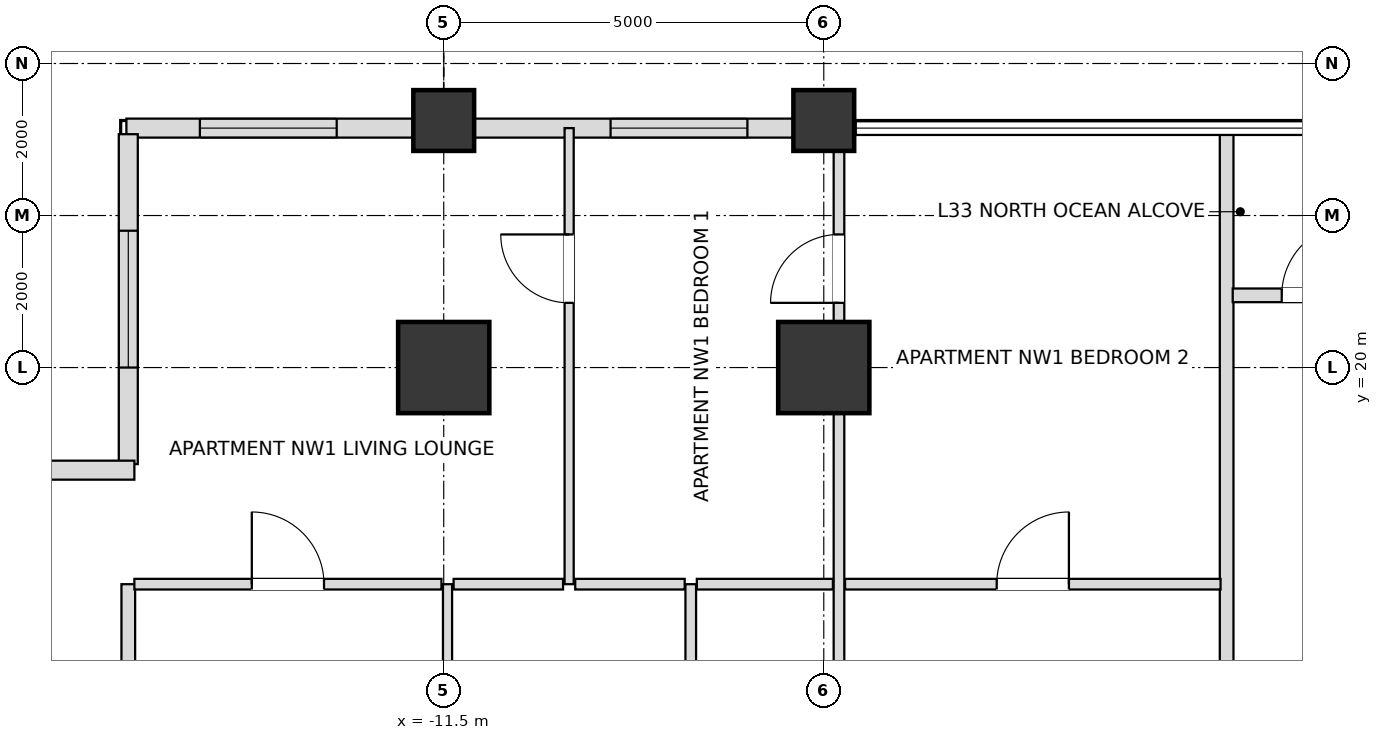
"""IFC4 building model, lengths in metres.
Left out: names, types, materials, properties, quantities, classifications, styles, units other than length and angle.
Written with IfcOpenShell. Run it as: python <this file> out.ifc"""

import sys

from ifc_helpers import new_model, si_unit, direction, frame, frame_2d, origin, origin_2d, place, context, subcontext, project, spatial, rectangle, extrude, element, fill, save


model = new_model("IFC4")
c1 = context("Model", 3, precision=1e-05, world=origin(), true_north=direction((0.0, 1.0)))
c2 = subcontext(c1, "Body", "Model", "MODEL_VIEW")
j1 = project(units=[si_unit("LENGTHUNIT", "METRE"), si_unit("PLANEANGLEUNIT", "RADIAN")], contexts=[c1])
p1 = place(None, origin())
s1 = spatial("IfcSite", under=j1, at=p1, CompositionType="ELEMENT")
p2 = place(p1, origin())
s2 = spatial("IfcBuilding", under=s1, at=p2, CompositionType="ELEMENT")
p3 = place(p2, frame((0.0, 0.0, 133.2)))
s3 = spatial("IfcBuildingStorey", under=s2, at=p3, CompositionType="ELEMENT", Elevation=133.2)
for number, where, z_axis, x_axis in (
    (1, (-6.5, 20.0, 0.0), (0.0, 0.0, 1.0), (1.0, 0.0, 0.0)),
    (2, (-11.5, 20.0, 0.0), (0.0, 0.0, 1.0), (1.0, 0.0, 0.0)),
):
    element("IfcColumn", number, at=place(p3, frame(where, z_axis=z_axis, x_axis=x_axis)), inside=s3, PredefinedType="USERDEFINED", context=c2, shape_type="SweptSolid", body=[
        extrude(rectangle(XDim=1.2, YDim=1.2, at=origin_2d()), origin(), (0.0, 0.0, 1.0), 3.6),
    ])
for number, where, z_axis, x_axis in (
    (3, (-11.5, 23.25, 0.0), (0.0, 0.0, 1.0), (1.0, 0.0, 0.0)),
    (4, (-6.5, 23.25, 0.0), (0.0, 0.0, 1.0), (1.0, 0.0, 0.0)),
):
    element("IfcColumn", number, at=place(p3, frame(where, z_axis=z_axis, x_axis=x_axis)), inside=s3, PredefinedType="COLUMN", context=c2, shape_type="SweptSolid", body=[
        extrude(rectangle(XDim=0.8, YDim=0.8, at=origin_2d()), origin(), (0.0, 0.0, 1.0), 3.6),
    ])
p4 = place(p3, frame((-6.895, 23.15, 0.0), z_axis=(0.0, 0.0, 1.0), x_axis=(-1.0, 0.0, 0.0)))
e5 = element("IfcWall", 5, at=p4, inside=s3, PredefinedType="SOLIDWALL", context=c2, shape_type="SweptSolid", body=[
    extrude(rectangle(XDim=4.21, YDim=0.25, at=frame_2d((2.105, 0.0))), origin(), (0.0, 0.0, 1.0), 2.736),
])
p5 = place(p4, frame((0.61, 0.0, 0.72)))
e6 = element("IfcOpeningElement", 6, at=p5, cuts=e5, PredefinedType="OPENING", context=c2, shape_type="SweptSolid", body=[
    extrude(rectangle(XDim=1.8, YDim=1.68, at=frame_2d((0.9, 0.84))), frame((0.0, 0.135, 0.0), z_axis=(0.0, -1.0, 0.0), x_axis=(1.0, 0.0, 0.0)), (0.0, 0.0, 1.0), 0.27),
])
p6 = place(p3, frame((-11.895, 23.15, 0.0), z_axis=(0.0, 0.0, 1.0), x_axis=(-1.0, 0.0, 0.0)))
e7 = element("IfcWall", 7, at=p6, inside=s3, PredefinedType="SOLIDWALL", context=c2, shape_type="SweptSolid", body=[
    extrude(rectangle(XDim=3.78, YDim=0.25, at=frame_2d((1.89, 0.0))), origin(), (0.0, 0.0, 1.0), 2.736),
])
p7 = place(p6, frame((1.013, 0.0, 0.72)))
e8 = element("IfcOpeningElement", 8, at=p7, cuts=e7, PredefinedType="OPENING", context=c2, shape_type="SweptSolid", body=[
    extrude(rectangle(XDim=1.8, YDim=1.68, at=frame_2d((0.9, 0.84))), frame((0.0, 0.135, 0.0), z_axis=(0.0, -1.0, 0.0), x_axis=(1.0, 0.0, 0.0)), (0.0, 0.0, 1.0), 0.27),
])
p8 = place(p3, frame((-15.65, 23.07, 0.0), z_axis=(0.0, 0.0, 1.0), x_axis=(0.0, -1.0, 0.0)))
e9 = element("IfcWall", 9, at=p8, inside=s3, PredefinedType="SOLIDWALL", context=c2, shape_type="SweptSolid", body=[
    extrude(rectangle(XDim=4.34, YDim=0.25, at=frame_2d((2.17, 0.0))), origin(), (0.0, 0.0, 1.0), 2.736),
])
p9 = place(p8, frame((1.27, 0.0, 0.72)))
e10 = element("IfcOpeningElement", 10, at=p9, cuts=e9, PredefinedType="OPENING", context=c2, shape_type="SweptSolid", body=[
    extrude(rectangle(XDim=1.8, YDim=1.68, at=frame_2d((0.9, 0.84))), frame((0.0, 0.135, 0.0), z_axis=(0.0, -1.0, 0.0), x_axis=(1.0, 0.0, 0.0)), (0.0, 0.0, 1.0), 0.27),
])
p10 = place(p3, frame((-15.57, 18.65, 0.0), z_axis=(0.0, 0.0, 1.0), x_axis=(-1.0, 0.0, 0.0)))
e11 = element("IfcWall", 11, at=p10, inside=s3, PredefinedType="SOLIDWALL", context=c2, shape_type="SweptSolid", body=[
    extrude(rectangle(XDim=4.66, YDim=0.25, at=frame_2d((2.33, 0.0))), origin(), (0.0, 0.0, 1.0), 2.736),
])
p11 = place(p10, frame((1.43, 0.0, 0.72)))
e12 = element("IfcOpeningElement", 12, at=p11, cuts=e11, PredefinedType="OPENING", context=c2, shape_type="SweptSolid", body=[
    extrude(rectangle(XDim=1.8, YDim=1.68, at=frame_2d((0.9, 0.84))), frame((0.0, 0.135, 0.0), z_axis=(0.0, -1.0, 0.0), x_axis=(1.0, 0.0, 0.0)), (0.0, 0.0, 1.0), 0.27),
])
p12 = place(p3, frame((-15.65, 9.8, 0.0), z_axis=(0.0, 0.0, 1.0), x_axis=(0.0, 1.0, 0.0)))
e13 = element("IfcWall", 13, at=p12, inside=s3, PredefinedType="PARTITIONING", context=c2, shape_type="SweptSolid", body=[
    extrude(rectangle(XDim=7.35, YDim=0.18, at=frame_2d((3.675, 0.0))), origin(), (0.0, 0.0, 1.0), 2.736),
])
p13 = place(p3, frame((-11.45, 9.8, 0.0), z_axis=(0.0, 0.0, 1.0), x_axis=(0.0, 1.0, 0.0)))
e14 = element("IfcWall", 14, at=p13, inside=s3, PredefinedType="PARTITIONING", context=c2, shape_type="SweptSolid", body=[
    extrude(rectangle(XDim=7.35, YDim=0.12, at=frame_2d((3.675, 0.0))), origin(), (0.0, 0.0, 1.0), 2.736),
])
p14 = place(p13, frame((3.713, 0.0, 0.0)))
e15 = element("IfcOpeningElement", 15, at=p14, cuts=e14, PredefinedType="OPENING", context=c2, shape_type="SweptSolid", body=[
    extrude(rectangle(XDim=0.95, YDim=2.1, at=frame_2d((0.475, 1.05))), frame((0.0, 0.07, 0.0), z_axis=(0.0, -1.0, 0.0), x_axis=(1.0, 0.0, 0.0)), (0.0, 0.0, 1.0), 0.14),
])
p15 = place(p3, frame((-9.85, 17.15, 0.0), z_axis=(0.0, 0.0, 1.0), x_axis=(0.0, 1.0, 0.0)))
e16 = element("IfcWall", 16, at=p15, inside=s3, PredefinedType="PARTITIONING", context=c2, shape_type="SweptSolid", body=[
    extrude(rectangle(XDim=6.0, YDim=0.12, at=frame_2d((3.0, 0.0))), origin(), (0.0, 0.0, 1.0), 2.816),
])
p16 = place(p15, frame((3.701, 0.0, 0.0)))
e17 = element("IfcOpeningElement", 17, at=p16, cuts=e16, PredefinedType="OPENING", context=c2, shape_type="SweptSolid", body=[
    extrude(rectangle(XDim=0.9, YDim=2.1, at=frame_2d((0.45, 1.05))), frame((0.0, 0.07, 0.0), z_axis=(0.0, -1.0, 0.0), x_axis=(1.0, 0.0, 0.0)), (0.0, 0.0, 1.0), 0.14),
])
p17 = place(p3, frame((-8.25, 9.8, 0.0), z_axis=(0.0, 0.0, 1.0), x_axis=(0.0, 1.0, 0.0)))
e18 = element("IfcWall", 18, at=p17, inside=s3, PredefinedType="PARTITIONING", context=c2, shape_type="SweptSolid", body=[
    extrude(rectangle(XDim=7.35, YDim=0.14, at=frame_2d((3.675, 0.0))), origin(), (0.0, 0.0, 1.0), 2.816),
])
p18 = place(p17, frame((3.22, 0.0, 0.0)))
e19 = element("IfcOpeningElement", 19, at=p18, cuts=e18, PredefinedType="OPENING", context=c2, shape_type="SweptSolid", body=[
    extrude(rectangle(XDim=0.9, YDim=2.1, at=frame_2d((0.45, 1.05))), frame((0.0, 0.08, 0.0), z_axis=(0.0, -1.0, 0.0), x_axis=(1.0, 0.0, 0.0)), (0.0, 0.0, 1.0), 0.16),
])
p19 = place(p3, frame((-6.3, 9.8, 0.0), z_axis=(0.0, 0.0, 1.0), x_axis=(0.0, 1.0, 0.0)))
e20 = element("IfcWall", 20, at=p19, inside=s3, PredefinedType="PARTITIONING", context=c2, shape_type="SweptSolid", body=[
    extrude(rectangle(XDim=13.35, YDim=0.14, at=frame_2d((6.675, 0.0))), origin(), (0.0, 0.0, 1.0), 2.816),
])
p20 = place(p19, frame((11.051, 0.0, 0.0)))
e21 = element("IfcOpeningElement", 21, at=p20, cuts=e20, PredefinedType="OPENING", context=c2, shape_type="SweptSolid", body=[
    extrude(rectangle(XDim=0.9, YDim=2.1, at=frame_2d((0.45, 1.05))), frame((0.0, 0.08, 0.0), z_axis=(0.0, -1.0, 0.0), x_axis=(1.0, 0.0, 0.0)), (0.0, 0.0, 1.0), 0.16),
])
p21 = place(p3, frame((-1.2, 9.8, 0.0), z_axis=(0.0, 0.0, 1.0), x_axis=(0.0, 1.0, 0.0)))
e22 = element("IfcWall", 22, at=p21, inside=s3, PredefinedType="PARTITIONING", context=c2, shape_type="SweptSolid", body=[
    extrude(rectangle(XDim=13.35, YDim=0.18, at=frame_2d((6.675, 0.0))), origin(), (0.0, 0.0, 1.0), 2.816),
])
p22 = place(p3, frame((-15.57, 17.15, 0.0), z_axis=(0.0, 0.0, 1.0), x_axis=(1.0, 0.0, 0.0)))
e23 = element("IfcWall", 23, at=p22, inside=s3, PredefinedType="PARTITIONING", context=c2, shape_type="SweptSolid", body=[
    extrude(rectangle(XDim=4.04, YDim=0.14, at=frame_2d((2.02, 0.0))), origin(), (0.0, 0.0, 1.0), 2.736),
])
p23 = place(p22, frame((1.545, 0.0, 0.0)))
e24 = element("IfcOpeningElement", 24, at=p23, cuts=e23, PredefinedType="OPENING", context=c2, shape_type="SweptSolid", body=[
    extrude(rectangle(XDim=0.95, YDim=2.1, at=frame_2d((0.475, 1.05))), frame((0.0, 0.08, 0.0), z_axis=(0.0, -1.0, 0.0), x_axis=(1.0, 0.0, 0.0)), (0.0, 0.0, 1.0), 0.16),
])
p24 = place(p3, frame((-11.37, 17.15, 0.0), z_axis=(0.0, 0.0, 1.0), x_axis=(1.0, 0.0, 0.0)))
e25 = element("IfcWall", 25, at=p24, inside=s3, PredefinedType="PARTITIONING", context=c2, shape_type="SweptSolid", body=[
    extrude(rectangle(XDim=1.44, YDim=0.14, at=frame_2d((0.72, 0.0))), origin(), (0.0, 0.0, 1.0), 3.38),
])
p25 = place(p3, frame((-9.77, 17.15, 0.0), z_axis=(0.0, 0.0, 1.0), x_axis=(1.0, 0.0, 0.0)))
e26 = element("IfcWall", 26, at=p25, inside=s3, PredefinedType="PARTITIONING", context=c2, shape_type="SweptSolid", body=[
    extrude(rectangle(XDim=1.44, YDim=0.14, at=frame_2d((0.72, 0.0))), origin(), (0.0, 0.0, 1.0), 3.38),
])
p26 = place(p3, frame((-8.17, 17.15, 0.0), z_axis=(0.0, 0.0, 1.0), x_axis=(1.0, 0.0, 0.0)))
e27 = element("IfcWall", 27, at=p26, inside=s3, PredefinedType="PARTITIONING", context=c2, shape_type="SweptSolid", body=[
    extrude(rectangle(XDim=1.79, YDim=0.14, at=frame_2d((0.895, 0.0))), origin(), (0.0, 0.0, 1.0), 2.816),
])
p27 = place(p3, frame((-6.22, 17.15, 0.0), z_axis=(0.0, 0.0, 1.0), x_axis=(1.0, 0.0, 0.0)))
e28 = element("IfcWall", 28, at=p27, inside=s3, PredefinedType="PARTITIONING", context=c2, shape_type="SweptSolid", body=[
    extrude(rectangle(XDim=4.94, YDim=0.14, at=frame_2d((2.47, 0.0))), origin(), (0.0, 0.0, 1.0), 3.38),
])
p28 = place(p27, frame((1.995, 0.0, 0.0)))
e29 = element("IfcOpeningElement", 29, at=p28, cuts=e28, PredefinedType="OPENING", context=c2, shape_type="SweptSolid", body=[
    extrude(rectangle(XDim=0.95, YDim=2.1, at=frame_2d((0.475, 1.05))), frame((0.0, 0.08, 0.0), z_axis=(0.0, -1.0, 0.0), x_axis=(1.0, 0.0, 0.0)), (0.0, 0.0, 1.0), 0.16),
])
p29 = place(p3, frame((-1.12, 20.95, 0.0), z_axis=(0.0, 0.0, 1.0), x_axis=(1.0, 0.0, 0.0)))
e30 = element("IfcWall", 30, at=p29, inside=s3, PredefinedType="PARTITIONING", context=c2, shape_type="SweptSolid", body=[
    extrude(rectangle(XDim=2.24, YDim=0.18, at=frame_2d((1.12, 0.0))), origin(), (0.0, 0.0, 1.0), 3.38),
])
p30 = place(p29, frame((0.645, 0.0, 0.0)))
e31 = element("IfcOpeningElement", 31, at=p30, cuts=e30, PredefinedType="OPENING", context=c2, shape_type="SweptSolid", body=[
    extrude(rectangle(XDim=0.95, YDim=2.15, at=frame_2d((0.475, 1.075))), frame((0.0, 0.1, 0.0), z_axis=(0.0, -1.0, 0.0), x_axis=(1.0, 0.0, 0.0)), (0.0, 0.0, 1.0), 0.2),
])
p31 = place(p5, origin())
e32 = element("IfcWindow", 32, at=p31, inside=s3, PartitioningType="SINGLE_PANEL", PredefinedType="WINDOW", context=c2, shape_type="SweptSolid", body=[
    extrude(rectangle(XDim=1.8, YDim=1.68, at=frame_2d((0.9, 0.84))), frame((0.0, 0.03, 0.0), z_axis=(0.0, -1.0, 0.0), x_axis=(1.0, 0.0, 0.0)), (0.0, 0.0, 1.0), 0.06),
])
fill(e6, e32)
p32 = place(p7, origin())
e33 = element("IfcWindow", 33, at=p32, inside=s3, PartitioningType="SINGLE_PANEL", PredefinedType="WINDOW", context=c2, shape_type="SweptSolid", body=[
    extrude(rectangle(XDim=1.8, YDim=1.68, at=frame_2d((0.9, 0.84))), frame((0.0, 0.03, 0.0), z_axis=(0.0, -1.0, 0.0), x_axis=(1.0, 0.0, 0.0)), (0.0, 0.0, 1.0), 0.06),
])
fill(e8, e33)
p33 = place(p9, origin())
e34 = element("IfcWindow", 34, at=p33, inside=s3, PartitioningType="SINGLE_PANEL", PredefinedType="WINDOW", context=c2, shape_type="SweptSolid", body=[
    extrude(rectangle(XDim=1.8, YDim=1.68, at=frame_2d((0.9, 0.84))), frame((0.0, 0.03, 0.0), z_axis=(0.0, -1.0, 0.0), x_axis=(1.0, 0.0, 0.0)), (0.0, 0.0, 1.0), 0.06),
])
fill(e10, e34)
p34 = place(p30, origin())
e35 = element("IfcDoor", 35, at=p34, inside=s3, OperationType="SINGLE_SWING_RIGHT", PredefinedType="DOOR", context=c2, shape_type="SweptSolid", body=[
    extrude(rectangle(XDim=0.95, YDim=2.15, at=frame_2d((0.475, 1.075))), frame((0.0, 0.025, 0.0), z_axis=(0.0, -1.0, 0.0), x_axis=(1.0, 0.0, 0.0)), (0.0, 0.0, 1.0), 0.05),
])
fill(e31, e35)
p35 = place(p28, origin())
e36 = element("IfcDoor", 36, at=p35, inside=s3, OperationType="SINGLE_SWING_RIGHT", PredefinedType="DOOR", context=c2, shape_type="SweptSolid", body=[
    extrude(rectangle(XDim=0.95, YDim=2.1, at=frame_2d((0.475, 1.05))), frame((0.0, 0.025, 0.0), z_axis=(0.0, -1.0, 0.0), x_axis=(1.0, 0.0, 0.0)), (0.0, 0.0, 1.0), 0.05),
])
fill(e29, e36)
p36 = place(p23, origin())
e37 = element("IfcDoor", 37, at=p36, inside=s3, OperationType="SINGLE_SWING_LEFT", PredefinedType="DOOR", context=c2, shape_type="SweptSolid", body=[
    extrude(rectangle(XDim=0.95, YDim=2.1, at=frame_2d((0.475, 1.05))), frame((0.0, 0.025, 0.0), z_axis=(0.0, -1.0, 0.0), x_axis=(1.0, 0.0, 0.0)), (0.0, 0.0, 1.0), 0.05),
])
fill(e24, e37)
p37 = place(p16, origin())
e38 = element("IfcDoor", 38, at=p37, inside=s3, OperationType="SINGLE_SWING_RIGHT", PredefinedType="DOOR", context=c2, shape_type="SweptSolid", body=[
    extrude(rectangle(XDim=0.9, YDim=2.1, at=frame_2d((0.45, 1.05))), frame((0.0, 0.025, 0.0), z_axis=(0.0, -1.0, 0.0), x_axis=(1.0, 0.0, 0.0)), (0.0, 0.0, 1.0), 0.05),
])
fill(e17, e38)
p38 = place(p20, origin())
e39 = element("IfcDoor", 39, at=p38, inside=s3, OperationType="SINGLE_SWING_LEFT", PredefinedType="DOOR", context=c2, shape_type="SweptSolid", body=[
    extrude(rectangle(XDim=0.9, YDim=2.1, at=frame_2d((0.45, 1.05))), frame((0.0, 0.025, 0.0), z_axis=(0.0, -1.0, 0.0), x_axis=(1.0, 0.0, 0.0)), (0.0, 0.0, 1.0), 0.05),
])
fill(e21, e39)
save(model, sys.argv[1])
